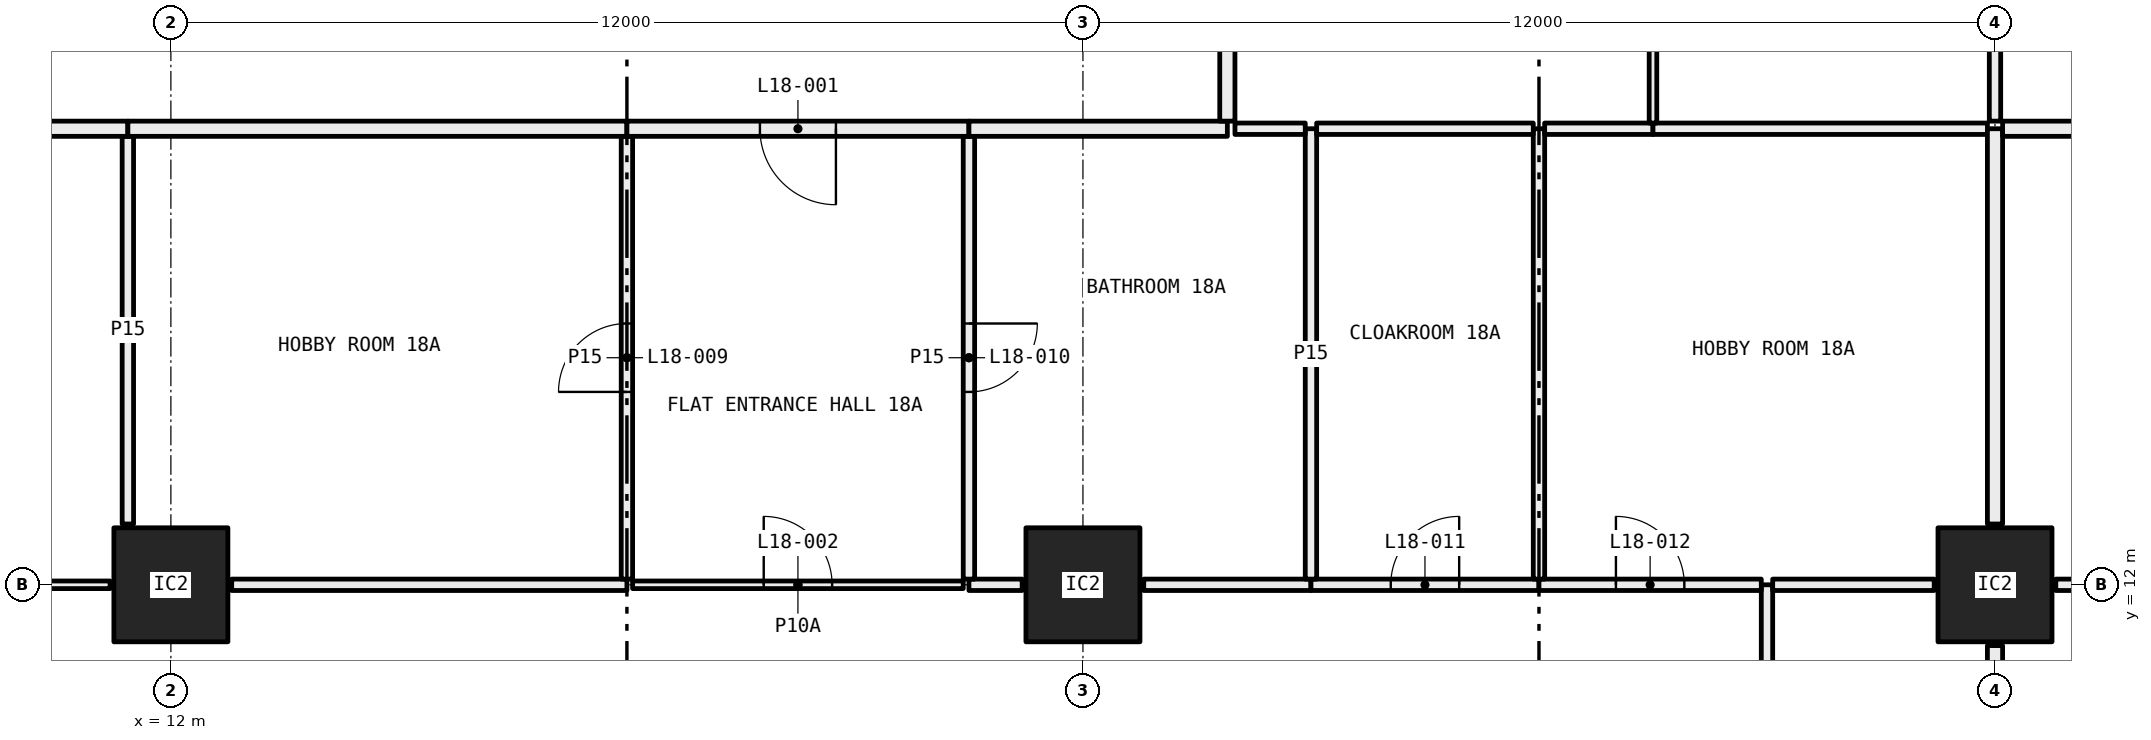
"""IFC4 building model, lengths in metres.
Left out: names, types, materials, properties, quantities, classifications, styles, units other than length and angle.
Written with IfcOpenShell. Run it as: python <this file> out.ifc"""

import sys

from ifc_helpers import new_model, si_unit, direction, frame, frame_2d, origin, origin_2d, place, context, subcontext, project, spatial, rectangle, hollow_rectangle, extrude, element, fill, save


model = new_model("IFC4")
c1 = context("Model", 3, precision=1e-05, world=origin(), true_north=direction((0.0, 1.0)))
c2 = subcontext(c1, "Body", "Model", "MODEL_VIEW")
j1 = project(units=[si_unit("LENGTHUNIT", "METRE"), si_unit("PLANEANGLEUNIT", "RADIAN")], contexts=[c1])
p1 = place(None, origin())
s1 = spatial("IfcSite", under=j1, at=p1, CompositionType="ELEMENT")
p2 = place(p1, origin())
s2 = spatial("IfcBuilding", under=s1, at=p2, CompositionType="ELEMENT")
p3 = place(p2, frame((0.0, 0.0, 74.85)))
s3 = spatial("IfcBuildingStorey", under=s2, at=p3, CompositionType="ELEMENT", Elevation=74.85)
for number, where, z_axis, x_axis in (
    (1, (12.0, 12.0, 0.0), (0.0, 0.0, 1.0), (1.0, 0.0, 0.0)),
    (2, (24.0, 12.0, 0.0), (0.0, 0.0, 1.0), (1.0, 0.0, 0.0)),
    (3, (36.0, 12.0, 0.0), (0.0, 0.0, 1.0), (1.0, 0.0, 0.0)),
):
    element("IfcColumn", number, at=place(p3, frame(where, z_axis=z_axis, x_axis=x_axis)), inside=s3, PredefinedType="COLUMN", context=c2, shape_type="SweptSolid", body=[
        extrude(hollow_rectangle(XDim=1.5, YDim=1.5, WallThickness=0.065, at=origin_2d()), origin(), (0.0, 0.0, 1.0), 3.05),
    ])
p4 = place(p3, frame((33.0, 6.075, 0.0), z_axis=(0.0, 0.0, 1.0), x_axis=(0.0, 1.0, 0.0)))
e4 = element("IfcWall", 4, at=p4, inside=s3, PredefinedType="PARTITIONING", context=c2, shape_type="SweptSolid", body=[
    extrude(rectangle(XDim=5.925, YDim=0.15, at=frame_2d((2.962, 0.0))), origin(), (0.0, 0.0, 1.0), 2.45),
])
p5 = place(p4, frame((2.512, 0.0, 0.0)))
e5 = element("IfcOpeningElement", 5, at=p5, cuts=e4, PredefinedType="OPENING", context=c2, shape_type="SweptSolid", body=[
    extrude(rectangle(XDim=0.9, YDim=2.1, at=frame_2d((0.45, 1.05))), frame((0.0, 0.085, 0.0), z_axis=(0.0, -1.0, 0.0), x_axis=(1.0, 0.0, 0.0)), (0.0, 0.0, 1.0), 0.17),
])
p6 = place(p3, frame((11.2, 12.0, 0.0), z_axis=(0.0, 0.0, 1.0), x_axis=(-1.0, 0.0, 0.0)))
e6 = element("IfcWall", 6, at=p6, inside=s3, PredefinedType="PARTITIONING", context=c2, shape_type="SweptSolid", body=[
    extrude(rectangle(XDim=10.48, YDim=0.1, at=frame_2d((5.24, 0.0))), origin(), (0.0, 0.0, 1.0), 2.45),
])
p7 = place(p6, frame((4.79, 0.0, 0.0)))
e7 = element("IfcOpeningElement", 7, at=p7, cuts=e6, PredefinedType="OPENING", context=c2, shape_type="SweptSolid", body=[
    extrude(rectangle(XDim=0.9, YDim=2.1, at=frame_2d((0.45, 1.05))), frame((0.0, 0.06, 0.0), z_axis=(0.0, -1.0, 0.0), x_axis=(1.0, 0.0, 0.0)), (0.0, 0.0, 1.0), 0.12),
])
p8 = place(p3, frame((18.0, 12.0, 0.0), z_axis=(0.0, 0.0, 1.0), x_axis=(-1.0, 0.0, 0.0)))
e8 = element("IfcWall", 8, at=p8, inside=s3, PredefinedType="PARTITIONING", context=c2, shape_type="SweptSolid", body=[
    extrude(rectangle(XDim=5.2, YDim=0.15, at=frame_2d((2.6, 0.0))), origin(), (0.0, 0.0, 1.0), 2.45),
])
p9 = place(p3, frame((22.425, 12.0, 0.0), z_axis=(0.0, 0.0, 1.0), x_axis=(-1.0, 0.0, 0.0)))
e9 = element("IfcWall", 9, at=p9, inside=s3, PredefinedType="PARTITIONING", context=c2, shape_type="SweptSolid", body=[
    extrude(rectangle(XDim=4.35, YDim=0.1, at=frame_2d((2.175, 0.0))), origin(), (0.0, 0.0, 1.0), 2.45),
])
p10 = place(p9, frame((1.725, 0.0, 0.0)))
e10 = element("IfcOpeningElement", 10, at=p10, cuts=e9, PredefinedType="OPENING", context=c2, shape_type="SweptSolid", body=[
    extrude(rectangle(XDim=0.9, YDim=2.1, at=frame_2d((0.45, 1.05))), frame((0.0, 0.06, 0.0), z_axis=(0.0, -1.0, 0.0), x_axis=(1.0, 0.0, 0.0)), (0.0, 0.0, 1.0), 0.12),
])
p11 = place(p3, frame((23.2, 12.0, 0.0), z_axis=(0.0, 0.0, 1.0), x_axis=(-1.0, 0.0, 0.0)))
e11 = element("IfcWall", 11, at=p11, inside=s3, PredefinedType="PARTITIONING", context=c2, shape_type="SweptSolid", body=[
    extrude(rectangle(XDim=0.7, YDim=0.15, at=frame_2d((0.35, 0.0))), origin(), (0.0, 0.0, 1.0), 2.45),
])
p12 = place(p3, frame((27.0, 12.0, 0.0), z_axis=(0.0, 0.0, 1.0), x_axis=(-1.0, 0.0, 0.0)))
e12 = element("IfcWall", 12, at=p12, inside=s3, PredefinedType="PARTITIONING", context=c2, shape_type="SweptSolid", body=[
    extrude(rectangle(XDim=2.2, YDim=0.15, at=frame_2d((1.1, 0.0))), origin(), (0.0, 0.0, 1.0), 2.45),
])
p13 = place(p3, frame((30.0, 12.0, 0.0), z_axis=(0.0, 0.0, 1.0), x_axis=(-1.0, 0.0, 0.0)))
e13 = element("IfcWall", 13, at=p13, inside=s3, PredefinedType="PARTITIONING", context=c2, shape_type="SweptSolid", body=[
    extrude(rectangle(XDim=3.0, YDim=0.15, at=frame_2d((1.5, 0.0))), origin(), (0.0, 0.0, 1.0), 2.45),
])
p14 = place(p13, frame((1.05, 0.0, 0.0)))
e14 = element("IfcOpeningElement", 14, at=p14, cuts=e13, PredefinedType="OPENING", context=c2, shape_type="SweptSolid", body=[
    extrude(rectangle(XDim=0.9, YDim=2.1, at=frame_2d((0.45, 1.05))), frame((0.0, 0.085, 0.0), z_axis=(0.0, -1.0, 0.0), x_axis=(1.0, 0.0, 0.0)), (0.0, 0.0, 1.0), 0.17),
])
p15 = place(p3, frame((32.925, 12.0, 0.0), z_axis=(0.0, 0.0, 1.0), x_axis=(-1.0, 0.0, 0.0)))
e15 = element("IfcWall", 15, at=p15, inside=s3, PredefinedType="PARTITIONING", context=c2, shape_type="SweptSolid", body=[
    extrude(rectangle(XDim=2.925, YDim=0.15, at=frame_2d((1.462, 0.0))), origin(), (0.0, 0.0, 1.0), 2.45),
])
p16 = place(p15, frame((1.012, 0.0, 0.0)))
e16 = element("IfcOpeningElement", 16, at=p16, cuts=e15, PredefinedType="OPENING", context=c2, shape_type="SweptSolid", body=[
    extrude(rectangle(XDim=0.9, YDim=2.1, at=frame_2d((0.45, 1.05))), frame((0.0, 0.085, 0.0), z_axis=(0.0, -1.0, 0.0), x_axis=(1.0, 0.0, 0.0)), (0.0, 0.0, 1.0), 0.17),
])
p17 = place(p3, frame((35.2, 12.0, 0.0), z_axis=(0.0, 0.0, 1.0), x_axis=(-1.0, 0.0, 0.0)))
e17 = element("IfcWall", 17, at=p17, inside=s3, PredefinedType="PARTITIONING", context=c2, shape_type="SweptSolid", body=[
    extrude(rectangle(XDim=2.125, YDim=0.15, at=frame_2d((1.062, 0.0))), origin(), (0.0, 0.0, 1.0), 2.45),
])
p18 = place(p3, frame((36.0, 6.0, 0.0), z_axis=(0.0, 0.0, 1.0), x_axis=(0.0, 1.0, 0.0)))
e18 = element("IfcWall", 18, at=p18, inside=s3, PredefinedType="PARTITIONING", context=c2, shape_type="SweptSolid", body=[
    extrude(rectangle(XDim=5.2, YDim=0.2, at=frame_2d((2.6, 0.0))), origin(), (0.0, 0.0, 1.0), 2.45),
])
p19 = place(p3, frame((11.434, 12.8, 0.0), z_axis=(0.0, 0.0, 1.0), x_axis=(0.0, 1.0, 0.0)))
e19 = element("IfcWall", 19, at=p19, inside=s3, PredefinedType="PARTITIONING", context=c2, shape_type="SweptSolid", body=[
    extrude(rectangle(XDim=5.1, YDim=0.15, at=frame_2d((2.55, 0.0))), origin(), (0.0, 0.0, 1.0), 3.05),
])
p20 = place(p3, frame((11.434, 18.0, 0.0), z_axis=(0.0, 0.0, 1.0), x_axis=(-1.0, 0.0, 0.0)))
e20 = element("IfcWall", 20, at=p20, inside=s3, PredefinedType="PARTITIONING", context=c2, shape_type="SweptSolid", body=[
    extrude(rectangle(XDim=1.334, YDim=0.2, at=frame_2d((0.667, 0.0))), origin(), (0.0, 0.0, 1.0), 3.05),
])
p21 = place(p3, frame((18.0, 12.075, 0.0), z_axis=(0.0, 0.0, 1.0), x_axis=(0.0, 1.0, 0.0)))
e21 = element("IfcWall", 21, at=p21, inside=s3, PredefinedType="PARTITIONING", context=c2, shape_type="SweptSolid", body=[
    extrude(rectangle(XDim=5.825, YDim=0.15, at=frame_2d((2.913, 0.0))), origin(), (0.0, 0.0, 1.0), 2.45),
])
p22 = place(p21, frame((2.462, 0.0, 0.0)))
e22 = element("IfcOpeningElement", 22, at=p22, cuts=e21, PredefinedType="OPENING", context=c2, shape_type="SweptSolid", body=[
    extrude(rectangle(XDim=0.9, YDim=2.1, at=frame_2d((0.45, 1.05))), frame((0.0, 0.085, 0.0), z_axis=(0.0, -1.0, 0.0), x_axis=(1.0, 0.0, 0.0)), (0.0, 0.0, 1.0), 0.17),
])
p23 = place(p3, frame((18.0, 18.0, 0.0), z_axis=(0.0, 0.0, 1.0), x_axis=(-1.0, 0.0, 0.0)))
e23 = element("IfcWall", 23, at=p23, inside=s3, PredefinedType="PARTITIONING", context=c2, shape_type="SweptSolid", body=[
    extrude(rectangle(XDim=6.566, YDim=0.2, at=frame_2d((3.283, 0.0))), origin(), (0.0, 0.0, 1.0), 3.05),
])
p24 = place(p3, frame((22.5, 12.075, 0.0), z_axis=(0.0, 0.0, 1.0), x_axis=(0.0, 1.0, 0.0)))
e24 = element("IfcWall", 24, at=p24, inside=s3, PredefinedType="PARTITIONING", context=c2, shape_type="SweptSolid", body=[
    extrude(rectangle(XDim=5.825, YDim=0.15, at=frame_2d((2.913, 0.0))), origin(), (0.0, 0.0, 1.0), 2.45),
])
p25 = place(p24, frame((2.462, 0.0, 0.0)))
e25 = element("IfcOpeningElement", 25, at=p25, cuts=e24, PredefinedType="OPENING", context=c2, shape_type="SweptSolid", body=[
    extrude(rectangle(XDim=0.9, YDim=2.1, at=frame_2d((0.45, 1.05))), frame((0.0, 0.085, 0.0), z_axis=(0.0, -1.0, 0.0), x_axis=(1.0, 0.0, 0.0)), (0.0, 0.0, 1.0), 0.17),
])
p26 = place(p3, frame((22.5, 18.0, 0.0), z_axis=(0.0, 0.0, 1.0), x_axis=(-1.0, 0.0, 0.0)))
e26 = element("IfcWall", 26, at=p26, inside=s3, PredefinedType="PARTITIONING", context=c2, shape_type="SweptSolid", body=[
    extrude(rectangle(XDim=4.5, YDim=0.2, at=frame_2d((2.25, 0.0))), origin(), (0.0, 0.0, 1.0), 3.05),
])
p27 = place(p26, frame((1.75, 0.0, 0.0)))
e27 = element("IfcOpeningElement", 27, at=p27, cuts=e26, PredefinedType="OPENING", context=c2, shape_type="SweptSolid", body=[
    extrude(rectangle(XDim=1.0, YDim=2.1, at=frame_2d((0.5, 1.05))), frame((0.0, 0.11, 0.0), z_axis=(0.0, -1.0, 0.0), x_axis=(1.0, 0.0, 0.0)), (0.0, 0.0, 1.0), 0.22),
])
p28 = place(p3, frame((27.0, 12.075, 0.0), z_axis=(0.0, 0.0, 1.0), x_axis=(0.0, 1.0, 0.0)))
e28 = element("IfcWall", 28, at=p28, inside=s3, PredefinedType="PARTITIONING", context=c2, shape_type="SweptSolid", body=[
    extrude(rectangle(XDim=5.925, YDim=0.15, at=frame_2d((2.962, 0.0))), origin(), (0.0, 0.0, 1.0), 2.45),
])
p29 = place(p3, frame((26.925, 18.0, 0.0), z_axis=(0.0, 0.0, 1.0), x_axis=(-1.0, 0.0, 0.0)))
e29 = element("IfcWall", 29, at=p29, inside=s3, PredefinedType="PARTITIONING", context=c2, shape_type="SweptSolid", body=[
    extrude(rectangle(XDim=0.925, YDim=0.15, at=frame_2d((0.462, 0.0))), origin(), (0.0, 0.0, 1.0), 3.05),
])
p30 = place(p3, frame((25.9, 18.0, 0.0), z_axis=(0.0, 0.0, 1.0), x_axis=(-1.0, 0.0, 0.0)))
e30 = element("IfcWall", 30, at=p30, inside=s3, PredefinedType="PARTITIONING", context=c2, shape_type="SweptSolid", body=[
    extrude(rectangle(XDim=3.4, YDim=0.2, at=frame_2d((1.7, 0.0))), origin(), (0.0, 0.0, 1.0), 3.05),
])
p31 = place(p3, frame((30.0, 12.075, 0.0), z_axis=(0.0, 0.0, 1.0), x_axis=(0.0, 1.0, 0.0)))
e31 = element("IfcWall", 31, at=p31, inside=s3, PredefinedType="PARTITIONING", context=c2, shape_type="SweptSolid", body=[
    extrude(rectangle(XDim=5.925, YDim=0.15, at=frame_2d((2.962, 0.0))), origin(), (0.0, 0.0, 1.0), 2.45),
])
p32 = place(p3, frame((29.925, 18.0, 0.0), z_axis=(0.0, 0.0, 1.0), x_axis=(-1.0, 0.0, 0.0)))
e32 = element("IfcWall", 32, at=p32, inside=s3, PredefinedType="PARTITIONING", context=c2, shape_type="SweptSolid", body=[
    extrude(rectangle(XDim=2.85, YDim=0.15, at=frame_2d((1.425, 0.0))), origin(), (0.0, 0.0, 1.0), 3.05),
])
p33 = place(p3, frame((31.5, 18.0, 0.0), z_axis=(0.0, 0.0, 1.0), x_axis=(-1.0, 0.0, 0.0)))
e33 = element("IfcWall", 33, at=p33, inside=s3, PredefinedType="PARTITIONING", context=c2, shape_type="SweptSolid", body=[
    extrude(rectangle(XDim=1.425, YDim=0.15, at=frame_2d((0.712, 0.0))), origin(), (0.0, 0.0, 1.0), 3.05),
])
p34 = place(p3, frame((35.9, 18.0, 0.0), z_axis=(0.0, 0.0, 1.0), x_axis=(-1.0, 0.0, 0.0)))
e34 = element("IfcWall", 34, at=p34, inside=s3, PredefinedType="PARTITIONING", context=c2, shape_type="SweptSolid", body=[
    extrude(rectangle(XDim=4.4, YDim=0.15, at=frame_2d((2.2, 0.0))), origin(), (0.0, 0.0, 1.0), 3.05),
])
p35 = place(p3, frame((36.0, 12.8, 0.0), z_axis=(0.0, 0.0, 1.0), x_axis=(0.0, 1.0, 0.0)))
e35 = element("IfcWall", 35, at=p35, inside=s3, PredefinedType="PARTITIONING", context=c2, shape_type="SweptSolid", body=[
    extrude(rectangle(XDim=5.2, YDim=0.2, at=frame_2d((2.6, 0.0))), origin(), (0.0, 0.0, 1.0), 2.45),
])
p36 = place(p3, frame((31.5, 18.075, 0.0), z_axis=(0.0, 0.0, 1.0), x_axis=(0.0, 1.0, 0.0)))
e36 = element("IfcWall", 36, at=p36, inside=s3, PredefinedType="PARTITIONING", context=c2, shape_type="SweptSolid", body=[
    extrude(rectangle(XDim=6.225, YDim=0.1, at=frame_2d((3.113, 0.0))), origin(), (0.0, 0.0, 1.0), 2.45),
])
p37 = place(p36, frame((2.663, 0.0, 0.0)))
e37 = element("IfcOpeningElement", 37, at=p37, cuts=e36, PredefinedType="OPENING", context=c2, shape_type="SweptSolid", body=[
    extrude(rectangle(XDim=0.9, YDim=2.1, at=frame_2d((0.45, 1.05))), frame((0.0, 0.06, 0.0), z_axis=(0.0, -1.0, 0.0), x_axis=(1.0, 0.0, 0.0)), (0.0, 0.0, 1.0), 0.12),
])
p38 = place(p3, frame((25.9, 23.9, 0.0), z_axis=(0.0, 0.0, 1.0), x_axis=(0.0, -1.0, 0.0)))
e38 = element("IfcWall", 38, at=p38, inside=s3, PredefinedType="PARTITIONING", context=c2, shape_type="SweptSolid", body=[
    extrude(rectangle(XDim=5.8, YDim=0.2, at=frame_2d((2.9, 0.0))), origin(), (0.0, 0.0, 1.0), 3.05),
])
p39 = place(p38, frame((2.4, 0.0, 0.0)))
e39 = element("IfcOpeningElement", 39, at=p39, cuts=e38, PredefinedType="OPENING", context=c2, shape_type="SweptSolid", body=[
    extrude(rectangle(XDim=1.0, YDim=2.1, at=frame_2d((0.5, 1.05))), frame((0.0, 0.11, 0.0), z_axis=(0.0, -1.0, 0.0), x_axis=(1.0, 0.0, 0.0)), (0.0, 0.0, 1.0), 0.22),
])
p40 = place(p3, frame((36.0, 18.1, 0.0), z_axis=(0.0, 0.0, 1.0), x_axis=(0.0, 1.0, 0.0)))
e40 = element("IfcWall", 40, at=p40, inside=s3, PredefinedType="PARTITIONING", context=c2, shape_type="SweptSolid", body=[
    extrude(rectangle(XDim=5.1, YDim=0.15, at=frame_2d((2.55, 0.0))), origin(), (0.0, 0.0, 1.0), 2.45),
])
p41 = place(p40, frame((2.1, 0.0, 0.0)))
e41 = element("IfcOpeningElement", 41, at=p41, cuts=e40, PredefinedType="OPENING", context=c2, shape_type="SweptSolid", body=[
    extrude(rectangle(XDim=0.9, YDim=2.1, at=frame_2d((0.45, 1.05))), frame((0.0, 0.085, 0.0), z_axis=(0.0, -1.0, 0.0), x_axis=(1.0, 0.0, 0.0)), (0.0, 0.0, 1.0), 0.17),
])
p42 = place(p3, frame((36.1, 18.0, 0.0), z_axis=(0.0, 0.0, 1.0), x_axis=(1.0, 0.0, 0.0)))
e42 = element("IfcWall", 42, at=p42, inside=s3, PredefinedType="PARTITIONING", context=c2, shape_type="SweptSolid", body=[
    extrude(rectangle(XDim=2.3, YDim=0.2, at=frame_2d((1.15, 0.0))), origin(), (0.0, 0.0, 1.0), 3.05),
])
p43 = place(p3, frame((38.925, 12.0, 0.0), z_axis=(0.0, 0.0, 1.0), x_axis=(-1.0, 0.0, 0.0)))
e43 = element("IfcWall", 43, at=p43, inside=s3, PredefinedType="PARTITIONING", context=c2, shape_type="SweptSolid", body=[
    extrude(rectangle(XDim=2.125, YDim=0.15, at=frame_2d((1.062, 0.0))), origin(), (0.0, 0.0, 1.0), 2.45),
])
p44 = place(p27, origin())
e44 = element("IfcDoor", 44, at=p44, inside=s3, OperationType="SINGLE_SWING_RIGHT", PredefinedType="DOOR", context=c2, shape_type="SweptSolid", body=[
    extrude(rectangle(XDim=1.0, YDim=2.1, at=frame_2d((0.5, 1.05))), frame((0.0, 0.025, 0.0), z_axis=(0.0, -1.0, 0.0), x_axis=(1.0, 0.0, 0.0)), (0.0, 0.0, 1.0), 0.05),
])
fill(e27, e44)
p45 = place(p10, frame((0.9, 0.0, 0.0), x_axis=(-1.0, 0.0, 0.0)))
e45 = element("IfcDoor", 45, at=p45, inside=s3, OperationType="SINGLE_SWING_RIGHT", PredefinedType="DOOR", context=c2, shape_type="SweptSolid", body=[
    extrude(rectangle(XDim=0.9, YDim=2.1, at=frame_2d((0.45, 1.05))), frame((0.0, 0.025, 0.0), z_axis=(0.0, -1.0, 0.0), x_axis=(1.0, 0.0, 0.0)), (0.0, 0.0, 1.0), 0.05),
])
fill(e10, e45)
p46 = place(p22, origin())
e46 = element("IfcDoor", 46, at=p46, inside=s3, OperationType="SINGLE_SWING_RIGHT", PredefinedType="DOOR", context=c2, shape_type="SweptSolid", body=[
    extrude(rectangle(XDim=0.9, YDim=2.1, at=frame_2d((0.45, 1.05))), frame((0.0, 0.025, 0.0), z_axis=(0.0, -1.0, 0.0), x_axis=(1.0, 0.0, 0.0)), (0.0, 0.0, 1.0), 0.05),
])
fill(e22, e46)
p47 = place(p25, frame((0.9, 0.0, 0.0), x_axis=(-1.0, 0.0, 0.0)))
e47 = element("IfcDoor", 47, at=p47, inside=s3, OperationType="SINGLE_SWING_RIGHT", PredefinedType="DOOR", context=c2, shape_type="SweptSolid", body=[
    extrude(rectangle(XDim=0.9, YDim=2.1, at=frame_2d((0.45, 1.05))), frame((0.0, 0.025, 0.0), z_axis=(0.0, -1.0, 0.0), x_axis=(1.0, 0.0, 0.0)), (0.0, 0.0, 1.0), 0.05),
])
fill(e25, e47)
p48 = place(p14, frame((0.9, 0.0, 0.0), x_axis=(-1.0, 0.0, 0.0)))
e48 = element("IfcDoor", 48, at=p48, inside=s3, OperationType="SINGLE_SWING_LEFT", PredefinedType="DOOR", context=c2, shape_type="SweptSolid", body=[
    extrude(rectangle(XDim=0.9, YDim=2.1, at=frame_2d((0.45, 1.05))), frame((0.0, 0.025, 0.0), z_axis=(0.0, -1.0, 0.0), x_axis=(1.0, 0.0, 0.0)), (0.0, 0.0, 1.0), 0.05),
])
fill(e14, e48)
p49 = place(p16, frame((0.9, 0.0, 0.0), x_axis=(-1.0, 0.0, 0.0)))
e49 = element("IfcDoor", 49, at=p49, inside=s3, OperationType="SINGLE_SWING_RIGHT", PredefinedType="DOOR", context=c2, shape_type="SweptSolid", body=[
    extrude(rectangle(XDim=0.9, YDim=2.1, at=frame_2d((0.45, 1.05))), frame((0.0, 0.025, 0.0), z_axis=(0.0, -1.0, 0.0), x_axis=(1.0, 0.0, 0.0)), (0.0, 0.0, 1.0), 0.05),
])
fill(e16, e49)
save(model, sys.argv[1])
